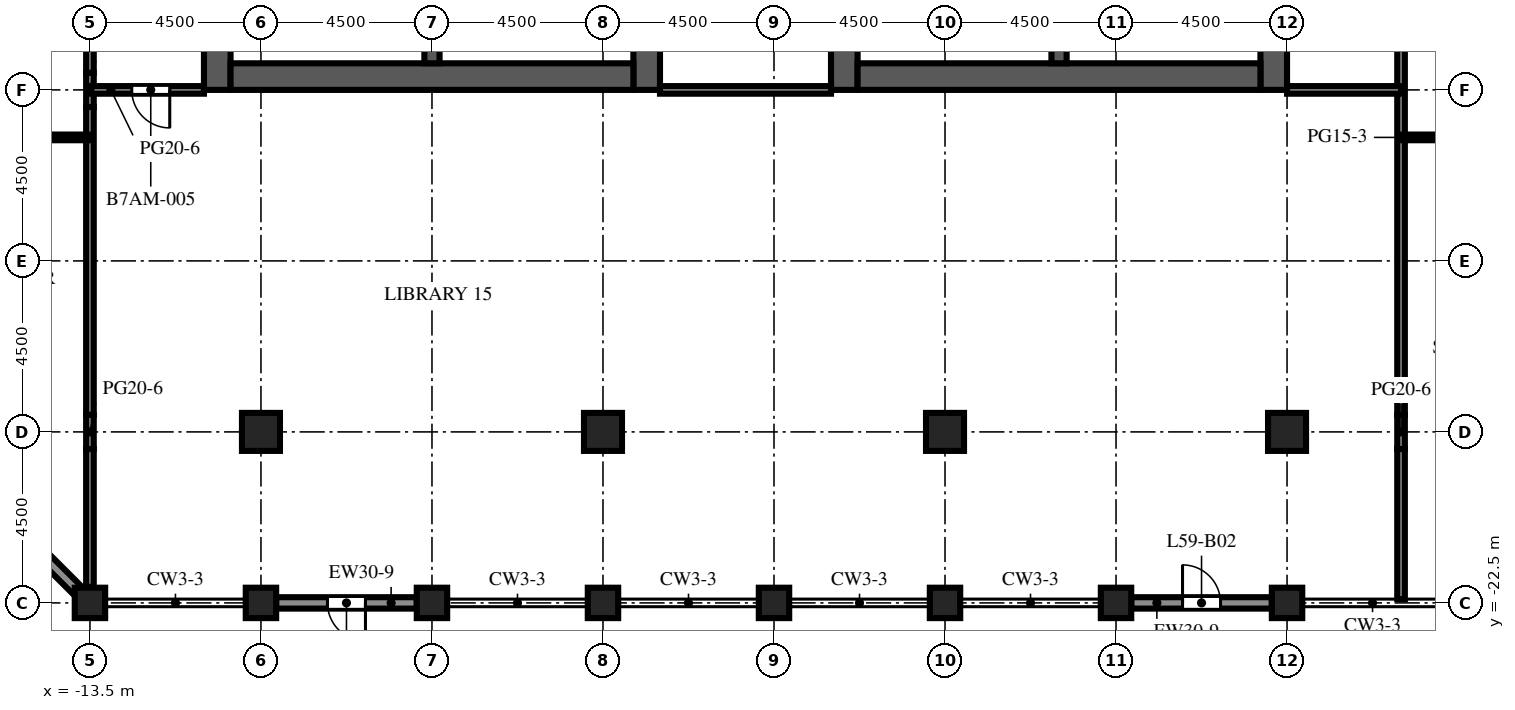
"""IFC4 building model, lengths in metres.
Left out: names, types, materials, properties, quantities, classifications, styles, units other than length and angle.
Written with IfcOpenShell. Run it as: python <this file> out.ifc"""

import sys

from ifc_helpers import new_model, si_unit, direction, frame, frame_2d, origin, origin_2d, place, context, subcontext, project, spatial, rectangle, extrude, element, fill, save


model = new_model("IFC4")
c1 = context("Model", 3, precision=1e-05, world=origin(), true_north=direction((0.0, 1.0)))
c2 = subcontext(c1, "Body", "Model", "MODEL_VIEW")
j1 = project(units=[si_unit("LENGTHUNIT", "METRE"), si_unit("PLANEANGLEUNIT", "RADIAN")], contexts=[c1])
p1 = place(None, origin())
s1 = spatial("IfcSite", under=j1, at=p1, CompositionType="ELEMENT")
p2 = place(p1, origin())
s2 = spatial("IfcBuilding", under=s1, at=p2, CompositionType="ELEMENT")
p3 = place(p2, frame((0.0, 0.0, 260.3)))
s3 = spatial("IfcBuildingStorey", under=s2, at=p3, CompositionType="ELEMENT", Elevation=260.3)
for number, where, z_axis, x_axis in (
    (1, (-13.5, -22.5, 0.0), (0.0, 0.0, 1.0), (1.0, 0.0, 0.0)),
    (2, (-9.0, -22.5, 0.0), (0.0, 0.0, 1.0), (1.0, 0.0, 0.0)),
    (3, (-4.5, -22.5, 0.0), (0.0, 0.0, 1.0), (1.0, 0.0, 0.0)),
    (4, (0.0, -22.5, 0.0), (0.0, 0.0, 1.0), (1.0, 0.0, 0.0)),
    (5, (4.5, -22.5, 0.0), (0.0, 0.0, 1.0), (1.0, 0.0, 0.0)),
    (6, (9.0, -22.5, 0.0), (0.0, 0.0, 1.0), (1.0, 0.0, 0.0)),
    (7, (13.5, -22.5, 0.0), (0.0, 0.0, 1.0), (1.0, 0.0, 0.0)),
    (8, (18.0, -22.5, 0.0), (0.0, 0.0, 1.0), (1.0, 0.0, 0.0)),
):
    element("IfcColumn", number, at=place(p3, frame(where, z_axis=z_axis, x_axis=x_axis)), inside=s3, PredefinedType="COLUMN", context=c2, shape_type="SweptSolid", body=[
        extrude(rectangle(XDim=0.8, YDim=0.8, at=origin_2d()), origin(), (0.0, 0.0, 1.0), 6.0),
    ])
for number, where, z_axis, x_axis in (
    (9, (-9.0, -18.0, 0.0), (0.0, 0.0, 1.0), (1.0, 0.0, 0.0)),
    (10, (0.0, -18.0, 0.0), (0.0, 0.0, 1.0), (1.0, 0.0, 0.0)),
    (11, (9.0, -18.0, 0.0), (0.0, 0.0, 1.0), (1.0, 0.0, 0.0)),
    (12, (18.0, -18.0, 0.0), (0.0, 0.0, 1.0), (1.0, 0.0, 0.0)),
):
    element("IfcColumn", number, at=place(p3, frame(where, z_axis=z_axis, x_axis=x_axis)), inside=s3, PredefinedType="COLUMN", context=c2, shape_type="SweptSolid", body=[
        extrude(rectangle(XDim=1.0, YDim=1.0, at=origin_2d()), origin(), (0.0, 0.0, 1.0), 5.55),
    ])
p4 = place(p3, frame((-10.15, -9.0, 0.0), z_axis=(0.0, 0.0, 1.0), x_axis=(0.0, 1.0, 0.0)))
e13 = element("IfcWall", 13, at=p4, inside=s3, PredefinedType="SHEAR", context=c2, shape_type="SweptSolid", body=[
    extrude(rectangle(XDim=27.5, YDim=0.7, at=frame_2d((13.75, 0.0))), origin(), (0.0, 0.0, 1.0), 6.0),
])
p5 = place(p4, frame((12.55, 0.0, 0.0)))
e14 = element("IfcOpeningElement", 14, at=p5, cuts=e13, PredefinedType="OPENING", context=c2, shape_type="SweptSolid", body=[
    extrude(rectangle(XDim=2.4, YDim=2.4, at=frame_2d((1.2, 1.2))), frame((0.0, 0.36, 0.0), z_axis=(0.0, -1.0, 0.0), x_axis=(1.0, 0.0, 0.0)), (0.0, 0.0, 1.0), 0.72),
])
p6 = place(p4, frame((6.825, 0.0, 0.0)))
e15 = element("IfcOpeningElement", 15, at=p6, cuts=e13, PredefinedType="OPENING", context=c2, shape_type="SweptSolid", body=[
    extrude(rectangle(XDim=1.2, YDim=2.1, at=frame_2d((0.6, 1.05))), frame((0.0, 0.36, 0.0), z_axis=(0.0, -1.0, 0.0), x_axis=(1.0, 0.0, 0.0)), (0.0, 0.0, 1.0), 0.72),
])
p7 = place(p4, frame((19.475, 0.0, 0.0)))
e16 = element("IfcOpeningElement", 16, at=p7, cuts=e13, PredefinedType="OPENING", context=c2, shape_type="SweptSolid", body=[
    extrude(rectangle(XDim=1.2, YDim=2.1, at=frame_2d((0.6, 1.05))), frame((0.0, 0.36, 0.0), z_axis=(0.0, -1.0, 0.0), x_axis=(1.0, 0.0, 0.0)), (0.0, 0.0, 1.0), 0.72),
])
p8 = place(p3, frame((1.15, -9.0, 0.0), z_axis=(0.0, 0.0, 1.0), x_axis=(0.0, 1.0, 0.0)))
e17 = element("IfcWall", 17, at=p8, inside=s3, PredefinedType="SHEAR", context=c2, shape_type="SweptSolid", body=[
    extrude(rectangle(XDim=27.5, YDim=0.7, at=frame_2d((13.75, 0.0))), origin(), (0.0, 0.0, 1.0), 6.0),
])
p9 = place(p8, frame((12.55, 0.0, 0.0)))
e18 = element("IfcOpeningElement", 18, at=p9, cuts=e17, PredefinedType="OPENING", context=c2, shape_type="SweptSolid", body=[
    extrude(rectangle(XDim=2.4, YDim=2.4, at=frame_2d((1.2, 1.2))), frame((0.0, 0.36, 0.0), z_axis=(0.0, -1.0, 0.0), x_axis=(1.0, 0.0, 0.0)), (0.0, 0.0, 1.0), 0.72),
])
p10 = place(p8, frame((3.788, 0.0, 0.0)))
e19 = element("IfcOpeningElement", 19, at=p10, cuts=e17, PredefinedType="OPENING", context=c2, shape_type="SweptSolid", body=[
    extrude(rectangle(XDim=0.968, YDim=2.1, at=frame_2d((0.484, 1.05))), frame((0.0, 0.36, 0.0), z_axis=(0.0, -1.0, 0.0), x_axis=(1.0, 0.0, 0.0)), (0.0, 0.0, 1.0), 0.72),
])
p11 = place(p8, frame((23.54, 0.0, 0.0)))
e20 = element("IfcOpeningElement", 20, at=p11, cuts=e17, PredefinedType="OPENING", context=c2, shape_type="SweptSolid", body=[
    extrude(rectangle(XDim=1.2, YDim=2.1, at=frame_2d((0.6, 1.05))), frame((0.0, 0.36, 0.0), z_axis=(0.0, -1.0, 0.0), x_axis=(1.0, 0.0, 0.0)), (0.0, 0.0, 1.0), 0.72),
])
p12 = place(p3, frame((-9.8, -8.65, 0.0), z_axis=(0.0, 0.0, 1.0), x_axis=(1.0, 0.0, 0.0)))
e21 = element("IfcWall", 21, at=p12, inside=s3, PredefinedType="SHEAR", context=c2, shape_type="SweptSolid", body=[
    extrude(rectangle(XDim=10.6, YDim=0.7, at=frame_2d((5.3, 0.0))), origin(), (0.0, 0.0, 1.0), 6.0),
])
p13 = place(p3, frame((-4.5, -8.3, 0.0), z_axis=(0.0, 0.0, 1.0), x_axis=(0.0, 1.0, 0.0)))
e22 = element("IfcWall", 22, at=p13, inside=s3, PredefinedType="SHEAR", context=c2, shape_type="SweptSolid", body=[
    extrude(rectangle(XDim=7.6, YDim=0.4, at=frame_2d((3.8, 0.0))), origin(), (0.0, 0.0, 1.0), 6.0),
])
p14 = place(p3, frame((6.35, -9.0, 0.0), z_axis=(0.0, 0.0, 1.0), x_axis=(0.0, 1.0, 0.0)))
e23 = element("IfcWall", 23, at=p14, inside=s3, PredefinedType="SHEAR", context=c2, shape_type="SweptSolid", body=[
    extrude(rectangle(XDim=27.5, YDim=0.7, at=frame_2d((13.75, 0.0))), origin(), (0.0, 0.0, 1.0), 6.0),
])
p15 = place(p14, frame((12.55, 0.0, 0.0)))
e24 = element("IfcOpeningElement", 24, at=p15, cuts=e23, PredefinedType="OPENING", context=c2, shape_type="SweptSolid", body=[
    extrude(rectangle(XDim=2.4, YDim=2.4, at=frame_2d((1.2, 1.2))), frame((0.0, 0.36, 0.0), z_axis=(0.0, -1.0, 0.0), x_axis=(1.0, 0.0, 0.0)), (0.0, 0.0, 1.0), 0.72),
])
p16 = place(p14, frame((3.788, 0.0, 0.0)))
e25 = element("IfcOpeningElement", 25, at=p16, cuts=e23, PredefinedType="OPENING", context=c2, shape_type="SweptSolid", body=[
    extrude(rectangle(XDim=0.968, YDim=2.1, at=frame_2d((0.484, 1.05))), frame((0.0, 0.36, 0.0), z_axis=(0.0, -1.0, 0.0), x_axis=(1.0, 0.0, 0.0)), (0.0, 0.0, 1.0), 0.72),
])
p17 = place(p14, frame((23.54, 0.0, 0.0)))
e26 = element("IfcOpeningElement", 26, at=p17, cuts=e23, PredefinedType="OPENING", context=c2, shape_type="SweptSolid", body=[
    extrude(rectangle(XDim=1.2, YDim=2.1, at=frame_2d((0.6, 1.05))), frame((0.0, 0.36, 0.0), z_axis=(0.0, -1.0, 0.0), x_axis=(1.0, 0.0, 0.0)), (0.0, 0.0, 1.0), 0.72),
])
p18 = place(p3, frame((17.65, -9.0, 0.0), z_axis=(0.0, 0.0, 1.0), x_axis=(0.0, 1.0, 0.0)))
e27 = element("IfcWall", 27, at=p18, inside=s3, PredefinedType="SHEAR", context=c2, shape_type="SweptSolid", body=[
    extrude(rectangle(XDim=27.5, YDim=0.7, at=frame_2d((13.75, 0.0))), origin(), (0.0, 0.0, 1.0), 6.0),
])
p19 = place(p18, frame((12.55, 0.0, 0.0)))
e28 = element("IfcOpeningElement", 28, at=p19, cuts=e27, PredefinedType="OPENING", context=c2, shape_type="SweptSolid", body=[
    extrude(rectangle(XDim=2.4, YDim=2.4, at=frame_2d((1.2, 1.2))), frame((0.0, 0.36, 0.0), z_axis=(0.0, -1.0, 0.0), x_axis=(1.0, 0.0, 0.0)), (0.0, 0.0, 1.0), 0.72),
])
p20 = place(p18, frame((6.825, 0.0, 0.0)))
e29 = element("IfcOpeningElement", 29, at=p20, cuts=e27, PredefinedType="OPENING", context=c2, shape_type="SweptSolid", body=[
    extrude(rectangle(XDim=1.2, YDim=2.1, at=frame_2d((0.6, 1.05))), frame((0.0, 0.36, 0.0), z_axis=(0.0, -1.0, 0.0), x_axis=(1.0, 0.0, 0.0)), (0.0, 0.0, 1.0), 0.72),
])
p21 = place(p18, frame((19.475, 0.0, 0.0)))
e30 = element("IfcOpeningElement", 30, at=p21, cuts=e27, PredefinedType="OPENING", context=c2, shape_type="SweptSolid", body=[
    extrude(rectangle(XDim=1.2, YDim=2.1, at=frame_2d((0.6, 1.05))), frame((0.0, 0.36, 0.0), z_axis=(0.0, -1.0, 0.0), x_axis=(1.0, 0.0, 0.0)), (0.0, 0.0, 1.0), 0.72),
])
p22 = place(p3, frame((6.7, -8.65, 0.0), z_axis=(0.0, 0.0, 1.0), x_axis=(1.0, 0.0, 0.0)))
e31 = element("IfcWall", 31, at=p22, inside=s3, PredefinedType="SHEAR", context=c2, shape_type="SweptSolid", body=[
    extrude(rectangle(XDim=10.6, YDim=0.7, at=frame_2d((5.3, 0.0))), origin(), (0.0, 0.0, 1.0), 6.0),
])
p23 = place(p3, frame((12.0, -8.3, 0.0), z_axis=(0.0, 0.0, 1.0), x_axis=(0.0, 1.0, 0.0)))
e32 = element("IfcWall", 32, at=p23, inside=s3, PredefinedType="SHEAR", context=c2, shape_type="SweptSolid", body=[
    extrude(rectangle(XDim=7.6, YDim=0.4, at=frame_2d((3.8, 0.0))), origin(), (0.0, 0.0, 1.0), 6.0),
])
p24 = place(p3, frame((-4.9, -22.5, 0.0), z_axis=(0.0, 0.0, 1.0), x_axis=(-1.0, 0.0, 0.0)))
e33 = element("IfcWall", 33, at=p24, inside=s3, PredefinedType="SOLIDWALL", context=c2, shape_type="SweptSolid", body=[
    extrude(rectangle(XDim=3.7, YDim=0.3, at=frame_2d((1.85, 0.0))), origin(), (0.0, 0.0, 1.0), 4.75),
])
p25 = place(p24, frame((1.35, 0.0, 0.0)))
e34 = element("IfcOpeningElement", 34, at=p25, cuts=e33, PredefinedType="OPENING", context=c2, shape_type="SweptSolid", body=[
    extrude(rectangle(XDim=1.0, YDim=2.2, at=frame_2d((0.5, 1.1))), frame((0.0, 0.16, 0.0), z_axis=(0.0, -1.0, 0.0), x_axis=(1.0, 0.0, 0.0)), (0.0, 0.0, 1.0), 0.32),
])
p26 = place(p3, frame((17.6, -22.5, 0.0), z_axis=(0.0, 0.0, 1.0), x_axis=(-1.0, 0.0, 0.0)))
e35 = element("IfcWall", 35, at=p26, inside=s3, PredefinedType="SOLIDWALL", context=c2, shape_type="SweptSolid", body=[
    extrude(rectangle(XDim=3.7, YDim=0.3, at=frame_2d((1.85, 0.0))), origin(), (0.0, 0.0, 1.0), 4.75),
])
p27 = place(p26, frame((1.35, 0.0, 0.0)))
e36 = element("IfcOpeningElement", 36, at=p27, cuts=e35, PredefinedType="OPENING", context=c2, shape_type="SweptSolid", body=[
    extrude(rectangle(XDim=1.0, YDim=2.2, at=frame_2d((0.5, 1.1))), frame((0.0, 0.16, 0.0), z_axis=(0.0, -1.0, 0.0), x_axis=(1.0, 0.0, 0.0)), (0.0, 0.0, 1.0), 0.32),
])
p28 = place(p3, frame((-13.794, -22.206, 0.0), z_axis=(0.0, 0.0, 1.0), x_axis=(-0.707106781187, 0.707106781187, 0.0)))
e37 = element("IfcWall", 37, at=p28, inside=s3, PredefinedType="SOLIDWALL", context=c2, shape_type="SweptSolid", body=[
    extrude(rectangle(XDim=5.532, YDim=0.3, at=frame_2d((2.766, 0.0))), origin(), (0.0, 0.0, 1.0), 3.75),
])
p29 = place(p28, frame((2.166, 0.0, 0.0)))
e38 = element("IfcOpeningElement", 38, at=p29, cuts=e37, PredefinedType="OPENING", context=c2, shape_type="SweptSolid", body=[
    extrude(rectangle(XDim=1.2, YDim=2.2, at=frame_2d((0.6, 1.1))), frame((0.0, 0.16, 0.0), z_axis=(0.0, -1.0, 0.0), x_axis=(1.0, 0.0, 0.0)), (0.0, 0.0, 1.0), 0.32),
])
p30 = place(p3, frame((-13.5, -22.077, 0.0), z_axis=(0.0, 0.0, 1.0), x_axis=(0.0, 1.0, 0.0)))
e39 = element("IfcWall", 39, at=p30, inside=s3, PredefinedType="PARTITIONING", context=c2, shape_type="SweptSolid", body=[
    extrude(rectangle(XDim=3.627, YDim=0.2, at=frame_2d((1.813, 0.0))), origin(), (0.0, 0.0, 1.0), 5.55),
])
p31 = place(p3, frame((-13.5, -18.45, 0.0), z_axis=(0.0, 0.0, 1.0), x_axis=(0.0, 1.0, 0.0)))
e40 = element("IfcWall", 40, at=p31, inside=s3, PredefinedType="PARTITIONING", context=c2, shape_type="SweptSolid", body=[
    extrude(rectangle(XDim=0.9, YDim=0.2, at=frame_2d((0.45, 0.0))), origin(), (0.0, 0.0, 1.0), 3.72),
])
p32 = place(p3, frame((-13.5, -17.55, 0.0), z_axis=(0.0, 0.0, 1.0), x_axis=(0.0, 1.0, 0.0)))
e41 = element("IfcWall", 41, at=p32, inside=s3, PredefinedType="PARTITIONING", context=c2, shape_type="SweptSolid", body=[
    extrude(rectangle(XDim=8.1, YDim=0.2, at=frame_2d((4.05, 0.0))), origin(), (0.0, 0.0, 1.0), 5.55),
])
p33 = place(p3, frame((-13.5, -9.45, 0.0), z_axis=(0.0, 0.0, 1.0), x_axis=(0.0, 1.0, 0.0)))
e42 = element("IfcWall", 42, at=p33, inside=s3, PredefinedType="PARTITIONING", context=c2, shape_type="SweptSolid", body=[
    extrude(rectangle(XDim=0.9, YDim=0.2, at=frame_2d((0.45, 0.0))), origin(), (0.0, 0.0, 1.0), 3.72),
])
p34 = place(p3, frame((-13.5, -8.55, 0.0), z_axis=(0.0, 0.0, 1.0), x_axis=(0.0, 1.0, 0.0)))
e43 = element("IfcWall", 43, at=p34, inside=s3, PredefinedType="PARTITIONING", context=c2, shape_type="SweptSolid", body=[
    extrude(rectangle(XDim=8.1, YDim=0.2, at=frame_2d((4.05, 0.0))), origin(), (0.0, 0.0, 1.0), 5.55),
])
p35 = place(p34, frame((4.65, 0.0, 0.0)))
e44 = element("IfcOpeningElement", 44, at=p35, cuts=e43, PredefinedType="OPENING", context=c2, shape_type="SweptSolid", body=[
    extrude(rectangle(XDim=1.0, YDim=2.1, at=frame_2d((0.5, 1.05))), frame((0.0, 0.11, 0.0), z_axis=(0.0, -1.0, 0.0), x_axis=(1.0, 0.0, 0.0)), (0.0, 0.0, 1.0), 0.22),
])
p36 = place(p3, frame((21.0, -22.4, 0.0), z_axis=(0.0, 0.0, 1.0), x_axis=(0.0, 1.0, 0.0)))
e45 = element("IfcWall", 45, at=p36, inside=s3, PredefinedType="PARTITIONING", context=c2, shape_type="SweptSolid", body=[
    extrude(rectangle(XDim=3.95, YDim=0.2, at=frame_2d((1.975, 0.0))), origin(), (0.0, 0.0, 1.0), 5.55),
])
p37 = place(p3, frame((21.0, -18.45, 0.0), z_axis=(0.0, 0.0, 1.0), x_axis=(0.0, 1.0, 0.0)))
e46 = element("IfcWall", 46, at=p37, inside=s3, PredefinedType="PARTITIONING", context=c2, shape_type="SweptSolid", body=[
    extrude(rectangle(XDim=0.9, YDim=0.2, at=frame_2d((0.45, 0.0))), origin(), (0.0, 0.0, 1.0), 3.72),
])
p38 = place(p3, frame((21.0, 3.25, 0.0), z_axis=(0.0, 0.0, 1.0), x_axis=(0.0, -1.0, 0.0)))
e47 = element("IfcWall", 47, at=p38, inside=s3, PredefinedType="PARTITIONING", context=c2, shape_type="SweptSolid", body=[
    extrude(rectangle(XDim=20.8, YDim=0.2, at=frame_2d((10.4, 0.0))), origin(), (0.0, 0.0, 1.0), 5.55),
])
p39 = place(p38, frame((4.15, 0.0, 0.0)))
e48 = element("IfcOpeningElement", 48, at=p39, cuts=e47, PredefinedType="OPENING", context=c2, shape_type="SweptSolid", body=[
    extrude(rectangle(XDim=1.0, YDim=2.1, at=frame_2d((0.5, 1.05))), frame((0.0, 0.11, 0.0), z_axis=(0.0, -1.0, 0.0), x_axis=(1.0, 0.0, 0.0)), (0.0, 0.0, 1.0), 0.22),
])
p40 = place(p3, frame((-13.5, -10.25, 0.0), z_axis=(0.0, 0.0, 1.0), x_axis=(-1.0, 0.0, 0.0)))
e49 = element("IfcWall", 49, at=p40, inside=s3, PredefinedType="PARTITIONING", context=c2, shape_type="SweptSolid", body=[
    extrude(rectangle(XDim=4.35, YDim=0.15, at=frame_2d((2.175, 0.0))), origin(), (0.0, 0.0, 1.0), 5.55),
])
p41 = place(p40, frame((1.65, 0.0, 0.0)))
e50 = element("IfcOpeningElement", 50, at=p41, cuts=e49, PredefinedType="OPENING", context=c2, shape_type="SweptSolid", body=[
    extrude(rectangle(XDim=1.0, YDim=2.1, at=frame_2d((0.5, 1.05))), frame((0.0, 0.085, 0.0), z_axis=(0.0, -1.0, 0.0), x_axis=(1.0, 0.0, 0.0)), (0.0, 0.0, 1.0), 0.17),
])
p42 = place(p3, frame((21.0, -10.25, 0.0), z_axis=(0.0, 0.0, 1.0), x_axis=(1.0, 0.0, 0.0)))
e51 = element("IfcWall", 51, at=p42, inside=s3, PredefinedType="PARTITIONING", context=c2, shape_type="SweptSolid", body=[
    extrude(rectangle(XDim=1.05, YDim=0.15, at=frame_2d((0.525, 0.0))), origin(), (0.0, 0.0, 1.0), 5.55),
])
p43 = place(p3, frame((-10.5, -9.0, 0.0), z_axis=(0.0, 0.0, 1.0), x_axis=(-1.0, 0.0, 0.0)))
e52 = element("IfcWall", 52, at=p43, inside=s3, PredefinedType="PARTITIONING", context=c2, shape_type="SweptSolid", body=[
    extrude(rectangle(XDim=3.0, YDim=0.2, at=frame_2d((1.5, 0.0))), origin(), (0.0, 0.0, 1.0), 3.72),
])
p44 = place(p43, frame((0.9, 0.0, 0.0)))
e53 = element("IfcOpeningElement", 53, at=p44, cuts=e52, PredefinedType="OPENING", context=c2, shape_type="SweptSolid", body=[
    extrude(rectangle(XDim=1.0, YDim=2.1, at=frame_2d((0.5, 1.05))), frame((0.0, 0.11, 0.0), z_axis=(0.0, -1.0, 0.0), x_axis=(1.0, 0.0, 0.0)), (0.0, 0.0, 1.0), 0.22),
])
p45 = place(p3, frame((1.5, -9.0, 0.0), z_axis=(0.0, 0.0, 1.0), x_axis=(1.0, 0.0, 0.0)))
e54 = element("IfcWall", 54, at=p45, inside=s3, PredefinedType="PARTITIONING", context=c2, shape_type="SweptSolid", body=[
    extrude(rectangle(XDim=4.5, YDim=0.2, at=frame_2d((2.25, 0.0))), origin(), (0.0, 0.0, 1.0), 5.55),
])
p46 = place(p3, frame((18.0, -9.0, 0.0), z_axis=(0.0, 0.0, 1.0), x_axis=(1.0, 0.0, 0.0)))
e55 = element("IfcWall", 55, at=p46, inside=s3, PredefinedType="PARTITIONING", context=c2, shape_type="SweptSolid", body=[
    extrude(rectangle(XDim=3.0, YDim=0.2, at=frame_2d((1.5, 0.0))), origin(), (0.0, 0.0, 1.0), 5.55),
])
p47 = place(p25, origin())
e56 = element("IfcDoor", 56, at=p47, inside=s3, OperationType="SINGLE_SWING_LEFT", PredefinedType="DOOR", context=c2, shape_type="SweptSolid", body=[
    extrude(rectangle(XDim=1.0, YDim=2.2, at=frame_2d((0.5, 1.1))), frame((0.0, 0.025, 0.0), z_axis=(0.0, -1.0, 0.0), x_axis=(1.0, 0.0, 0.0)), (0.0, 0.0, 1.0), 0.05),
])
fill(e34, e56)
p48 = place(p27, origin())
e57 = element("IfcDoor", 57, at=p48, inside=s3, OperationType="SINGLE_SWING_RIGHT", PredefinedType="DOOR", context=c2, shape_type="SweptSolid", body=[
    extrude(rectangle(XDim=1.0, YDim=2.2, at=frame_2d((0.5, 1.1))), frame((0.0, 0.025, 0.0), z_axis=(0.0, -1.0, 0.0), x_axis=(1.0, 0.0, 0.0)), (0.0, 0.0, 1.0), 0.05),
])
fill(e36, e57)
p49 = place(p44, origin())
e58 = element("IfcDoor", 58, at=p49, inside=s3, OperationType="SINGLE_SWING_LEFT", PredefinedType="DOOR", context=c2, shape_type="SweptSolid", body=[
    extrude(rectangle(XDim=1.0, YDim=2.1, at=frame_2d((0.5, 1.05))), frame((0.0, 0.025, 0.0), z_axis=(0.0, -1.0, 0.0), x_axis=(1.0, 0.0, 0.0)), (0.0, 0.0, 1.0), 0.05),
])
fill(e53, e58)
save(model, sys.argv[1])
